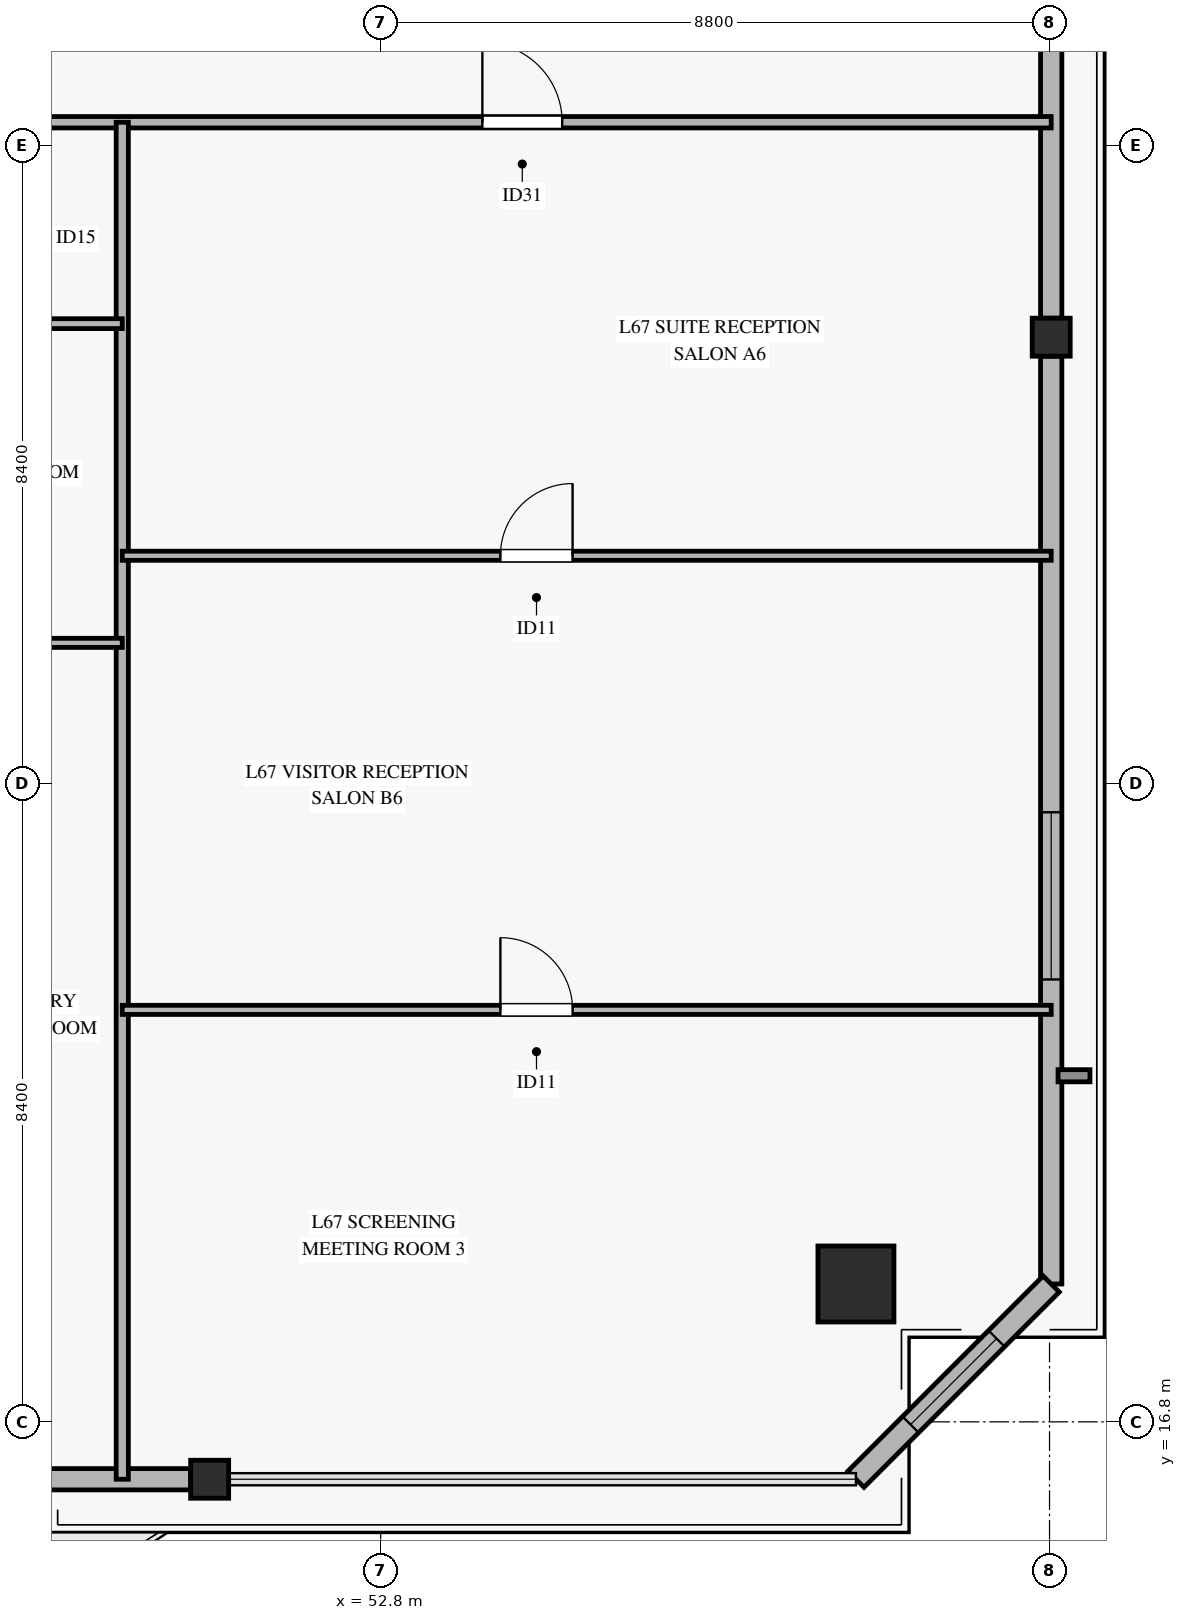
"""IFC4 building model, lengths in metres.
Left out: names, types, materials, properties, quantities, classifications, styles, units other than length and angle.
Written with IfcOpenShell. Run it as: python <this file> out.ifc"""

import sys

from ifc_helpers import new_model, si_unit, direction, frame, frame_2d, origin, origin_2d, place, context, subcontext, project, spatial, rectangle, hollow_rectangle, extrude, source, transform, mapped, element, fill, save


model = new_model("IFC4")
c1 = context("Model", 3, precision=1e-05, world=origin(), true_north=direction((0.0, 1.0)))
c2 = subcontext(c1, "Body", "Model", "MODEL_VIEW")
j1 = project(units=[si_unit("LENGTHUNIT", "METRE"), si_unit("PLANEANGLEUNIT", "RADIAN")], contexts=[c1])
p1 = place(None, origin())
s1 = spatial("IfcSite", under=j1, at=p1, CompositionType="ELEMENT")
p2 = place(p1, origin())
s2 = spatial("IfcBuilding", under=s1, at=p2, CompositionType="ELEMENT")
p3 = place(p2, frame((0.0, 0.0, 262.1)))
s3 = spatial("IfcBuildingStorey", under=s2, at=p3, CompositionType="ELEMENT", Elevation=262.1)
m1 = source(origin(), c2, "Body", "SweptSolid", [
    extrude(hollow_rectangle(XDim=1.0, YDim=1.0, WallThickness=0.045, at=origin_2d()), origin(), (0.0, 0.0, 1.0), 3.185),
])
p4 = place(p3, frame((59.053, 18.614, 0.0), z_axis=(0.0, 0.0, 1.0), x_axis=(1.0, 0.0, 0.0)))
e1 = element("IfcColumn", 1, at=p4, inside=s3, PredefinedType="COLUMN", context=c2, shape_type="MappedRepresentation", body=[
    mapped(m1, transform((0.0, 0.0, 0.0), x_axis=(1.0, 0.0, 0.0), y_axis=(0.0, 1.0, 0.0), z_axis=(0.0, 0.0, 1.0), scale=1.0)),
])
m2 = source(origin(), c2, "Body", "SweptSolid", [
    extrude(hollow_rectangle(XDim=0.5, YDim=0.5, WallThickness=0.024, at=origin_2d()), origin(), (0.0, 0.0, 1.0), 3.185),
])
for number, where, z_axis, x_axis in (
    (2, (50.55, 16.045, 0.0), (0.0, 0.0, 1.0), (1.0, 0.0, 0.0)),
    (3, (61.622, 31.072, 0.0), (0.0, 0.0, 1.0), (1.0, 0.0, 0.0)),
):
    element("IfcColumn", number, at=place(p3, frame(where, z_axis=z_axis, x_axis=x_axis)), inside=s3, PredefinedType="COLUMN", context=c2, shape_type="MappedRepresentation", body=[
        mapped(m2, transform((0.0, 0.0, 0.0), x_axis=(1.0, 0.0, 0.0), y_axis=(0.0, 1.0, 0.0), z_axis=(0.0, 0.0, 1.0), scale=1.0)),
    ])
p5 = place(p3, frame((44.55, 16.045, 0.0), z_axis=(0.0, 0.0, 1.0), x_axis=(1.0, 0.0, 0.0)))
e4 = element("IfcWall", 4, at=p5, inside=s3, PredefinedType="SOLIDWALL", context=c2, shape_type="SweptSolid", body=[
    extrude(rectangle(XDim=5.75, YDim=0.28, at=frame_2d((2.875, 0.0))), origin(), (0.0, 0.0, 1.0), 2.815),
])
p6 = place(p5, frame((1.95, 0.0, 0.0)))
e5 = element("IfcOpeningElement", 5, at=p6, cuts=e4, PredefinedType="OPENING", context=c2, shape_type="SweptSolid", body=[
    extrude(rectangle(XDim=1.8, YDim=2.25, at=frame_2d((0.9, 1.125))), frame((0.0, 0.15, 0.0), z_axis=(0.0, -1.0, 0.0), x_axis=(1.0, 0.0, 0.0)), (0.0, 0.0, 1.0), 0.3),
])
p7 = place(p3, frame((61.622, 18.614, 0.0), z_axis=(0.0, 0.0, 1.0), x_axis=(0.0, 1.0, 0.0)))
e6 = element("IfcWall", 6, at=p7, inside=s3, PredefinedType="SOLIDWALL", context=c2, shape_type="SweptSolid", body=[
    extrude(rectangle(XDim=12.208, YDim=0.28, at=frame_2d((6.104, 0.0))), origin(), (0.0, 0.0, 1.0), 2.815),
])
p8 = place(p7, frame((4.007, 0.0, 0.45)))
e7 = element("IfcOpeningElement", 7, at=p8, cuts=e6, PredefinedType="OPENING", context=c2, shape_type="SweptSolid", body=[
    extrude(rectangle(XDim=2.2, YDim=2.1, at=frame_2d((1.1, 1.05))), frame((0.0, 0.15, 0.0), z_axis=(0.0, -1.0, 0.0), x_axis=(1.0, 0.0, 0.0)), (0.0, 0.0, 1.0), 0.3),
])
p9 = place(p3, frame((61.622, 31.322, 0.0), z_axis=(0.0, 0.0, 1.0), x_axis=(0.0, 1.0, 0.0)))
e8 = element("IfcWall", 8, at=p9, inside=s3, PredefinedType="SOLIDWALL", context=c2, shape_type="SweptSolid", body=[
    extrude(rectangle(XDim=12.208, YDim=0.28, at=frame_2d((6.104, 0.0))), origin(), (0.0, 0.0, 1.0), 2.815),
])
p10 = place(p9, frame((7.171, 0.0, 0.45)))
e9 = element("IfcOpeningElement", 9, at=p10, cuts=e8, PredefinedType="OPENING", context=c2, shape_type="SweptSolid", body=[
    extrude(rectangle(XDim=2.2, YDim=2.1, at=frame_2d((1.1, 1.05))), frame((0.0, 0.15, 0.0), z_axis=(0.0, -1.0, 0.0), x_axis=(1.0, 0.0, 0.0)), (0.0, 0.0, 1.0), 0.3),
])
p11 = place(p3, frame((59.053, 16.045, 0.0), z_axis=(0.0, 0.0, 1.0), x_axis=(0.707106781187, 0.707106781187, 0.0)))
e10 = element("IfcWall", 10, at=p11, inside=s3, PredefinedType="SOLIDWALL", context=c2, shape_type="SweptSolid", body=[
    extrude(rectangle(XDim=3.633, YDim=0.3, at=frame_2d((1.817, 0.0))), origin(), (0.0, 0.0, 1.0), 2.815),
])
p12 = place(p11, frame((1.017, 0.0, 0.45)))
e11 = element("IfcOpeningElement", 11, at=p12, cuts=e10, PredefinedType="OPENING", context=c2, shape_type="SweptSolid", body=[
    extrude(rectangle(XDim=1.6, YDim=2.0, at=frame_2d((0.8, 1.0))), frame((0.0, 0.16, 0.0), z_axis=(0.0, -1.0, 0.0), x_axis=(1.0, 0.0, 0.0)), (0.0, 0.0, 1.0), 0.32),
])
p13 = place(p3, frame((8.779, 33.9, 0.0), z_axis=(0.0, 0.0, 1.0), x_axis=(1.0, 0.0, 0.0)))
e12 = element("IfcWall", 12, at=p13, inside=s3, PredefinedType="PARTITIONING", context=c2, shape_type="SweptSolid", body=[
    extrude(rectangle(XDim=52.843, YDim=0.15, at=frame_2d((26.421, 0.0))), origin(), (0.0, 0.0, 1.0), 2.47),
])
p14 = place(p13, frame((5.887, 0.0, 0.0)))
e13 = element("IfcOpeningElement", 13, at=p14, cuts=e12, PredefinedType="OPENING", context=c2, shape_type="SweptSolid", body=[
    extrude(rectangle(XDim=1.05, YDim=2.15, at=frame_2d((0.525, 1.075))), frame((0.0, 0.085, 0.0), z_axis=(0.0, -1.0, 0.0), x_axis=(1.0, 0.0, 0.0)), (0.0, 0.0, 1.0), 0.17),
])
p15 = place(p13, frame((17.646, 0.0, 0.0)))
e14 = element("IfcOpeningElement", 14, at=p15, cuts=e12, PredefinedType="OPENING", context=c2, shape_type="SweptSolid", body=[
    extrude(rectangle(XDim=1.05, YDim=2.15, at=frame_2d((0.525, 1.075))), frame((0.0, 0.085, 0.0), z_axis=(0.0, -1.0, 0.0), x_axis=(1.0, 0.0, 0.0)), (0.0, 0.0, 1.0), 0.17),
])
p16 = place(p13, frame((24.174, 0.0, 0.0)))
e15 = element("IfcOpeningElement", 15, at=p16, cuts=e12, PredefinedType="OPENING", context=c2, shape_type="SweptSolid", body=[
    extrude(rectangle(XDim=1.05, YDim=2.15, at=frame_2d((0.525, 1.075))), frame((0.0, 0.085, 0.0), z_axis=(0.0, -1.0, 0.0), x_axis=(1.0, 0.0, 0.0)), (0.0, 0.0, 1.0), 0.17),
])
p17 = place(p13, frame((31.096, 0.0, 0.0)))
e16 = element("IfcOpeningElement", 16, at=p17, cuts=e12, PredefinedType="OPENING", context=c2, shape_type="SweptSolid", body=[
    extrude(rectangle(XDim=1.05, YDim=2.15, at=frame_2d((0.525, 1.075))), frame((0.0, 0.085, 0.0), z_axis=(0.0, -1.0, 0.0), x_axis=(1.0, 0.0, 0.0)), (0.0, 0.0, 1.0), 0.17),
])
p18 = place(p13, frame((37.241, 0.0, 0.0)))
e17 = element("IfcOpeningElement", 17, at=p18, cuts=e12, PredefinedType="OPENING", context=c2, shape_type="SweptSolid", body=[
    extrude(rectangle(XDim=1.05, YDim=2.15, at=frame_2d((0.525, 1.075))), frame((0.0, 0.085, 0.0), z_axis=(0.0, -1.0, 0.0), x_axis=(1.0, 0.0, 0.0)), (0.0, 0.0, 1.0), 0.17),
])
p19 = place(p13, frame((45.359, 0.0, 0.0)))
e18 = element("IfcOpeningElement", 18, at=p19, cuts=e12, PredefinedType="OPENING", context=c2, shape_type="SweptSolid", body=[
    extrude(rectangle(XDim=1.05, YDim=2.15, at=frame_2d((0.525, 1.075))), frame((0.0, 0.085, 0.0), z_axis=(0.0, -1.0, 0.0), x_axis=(1.0, 0.0, 0.0)), (0.0, 0.0, 1.0), 0.17),
])
p20 = place(p3, frame((49.4, 16.045, 0.0), z_axis=(0.0, 0.0, 1.0), x_axis=(0.0, 1.0, 0.0)))
e19 = element("IfcWall", 19, at=p20, inside=s3, PredefinedType="PARTITIONING", context=c2, shape_type="SweptSolid", body=[
    extrude(rectangle(XDim=17.855, YDim=0.16, at=frame_2d((8.927, 0.0))), origin(), (0.0, 0.0, 1.0), 2.77),
])
p21 = place(p3, frame((47.82, 31.25, 0.0), z_axis=(0.0, 0.0, 1.0), x_axis=(1.0, 0.0, 0.0)))
e20 = element("IfcWall", 20, at=p21, inside=s3, PredefinedType="PARTITIONING", context=c2, shape_type="SweptSolid", body=[
    extrude(rectangle(XDim=1.58, YDim=0.13, at=frame_2d((0.79, 0.0))), origin(), (0.0, 0.0, 1.0), 3.185),
])
p22 = place(p3, frame((45.72, 27.05, 0.0), z_axis=(0.0, 0.0, 1.0), x_axis=(1.0, 0.0, 0.0)))
e21 = element("IfcWall", 21, at=p22, inside=s3, PredefinedType="PARTITIONING", context=c2, shape_type="SweptSolid", body=[
    extrude(rectangle(XDim=3.68, YDim=0.12, at=frame_2d((1.84, 0.0))), origin(), (0.0, 0.0, 1.0), 3.185),
])
p23 = place(p3, frame((49.4, 22.221, 0.0), z_axis=(0.0, 0.0, 1.0), x_axis=(1.0, 0.0, 0.0)))
e22 = element("IfcWall", 22, at=p23, inside=s3, PredefinedType="PARTITIONING", context=c2, shape_type="SweptSolid", body=[
    extrude(rectangle(XDim=12.222, YDim=0.12, at=frame_2d((6.111, 0.0))), origin(), (0.0, 0.0, 1.0), 2.47),
])
p24 = place(p23, frame((4.975, 0.0, 0.0)))
e23 = element("IfcOpeningElement", 23, at=p24, cuts=e22, PredefinedType="OPENING", context=c2, shape_type="SweptSolid", body=[
    extrude(rectangle(XDim=0.95, YDim=2.1, at=frame_2d((0.475, 1.05))), frame((0.0, 0.07, 0.0), z_axis=(0.0, -1.0, 0.0), x_axis=(1.0, 0.0, 0.0)), (0.0, 0.0, 1.0), 0.14),
])
p25 = place(p3, frame((49.4, 28.196, 0.0), z_axis=(0.0, 0.0, 1.0), x_axis=(1.0, 0.0, 0.0)))
e24 = element("IfcWall", 24, at=p25, inside=s3, PredefinedType="PARTITIONING", context=c2, shape_type="SweptSolid", body=[
    extrude(rectangle(XDim=12.222, YDim=0.12, at=frame_2d((6.111, 0.0))), origin(), (0.0, 0.0, 1.0), 2.47),
])
p26 = place(p25, frame((4.975, 0.0, 0.0)))
e25 = element("IfcOpeningElement", 25, at=p26, cuts=e24, PredefinedType="OPENING", context=c2, shape_type="SweptSolid", body=[
    extrude(rectangle(XDim=0.95, YDim=2.1, at=frame_2d((0.475, 1.05))), frame((0.0, 0.07, 0.0), z_axis=(0.0, -1.0, 0.0), x_axis=(1.0, 0.0, 0.0)), (0.0, 0.0, 1.0), 0.14),
])
m3 = source(origin(), c2, "Body", "SweptSolid", [
    extrude(rectangle(XDim=2.2, YDim=2.1, at=frame_2d((1.1, 1.05))), frame((0.0, 0.03, 0.0), z_axis=(0.0, -1.0, 0.0), x_axis=(1.0, 0.0, 0.0)), (0.0, 0.0, 1.0), 0.06),
])
p27 = place(p8, origin())
e26 = element("IfcWindow", 26, at=p27, inside=s3, PartitioningType="SINGLE_PANEL", PredefinedType="WINDOW", context=c2, shape_type="MappedRepresentation", body=[
    mapped(m3, transform((0.0, 0.0, 0.0), x_axis=(1.0, 0.0, 0.0), y_axis=(0.0, 1.0, 0.0), z_axis=(0.0, 0.0, 1.0), scale=1.0)),
])
fill(e7, e26)
m4 = source(origin(), c2, "Body", "SweptSolid", [
    extrude(rectangle(XDim=1.6, YDim=2.0, at=frame_2d((0.8, 1.0))), frame((0.0, 0.03, 0.0), z_axis=(0.0, -1.0, 0.0), x_axis=(1.0, 0.0, 0.0)), (0.0, 0.0, 1.0), 0.06),
])
p28 = place(p12, origin())
e27 = element("IfcWindow", 27, at=p28, inside=s3, PartitioningType="SINGLE_PANEL", PredefinedType="WINDOW", context=c2, shape_type="MappedRepresentation", body=[
    mapped(m4, transform((0.0, 0.0, 0.0), x_axis=(1.0, 0.0, 0.0), y_axis=(0.0, 1.0, 0.0), z_axis=(0.0, 0.0, 1.0), scale=1.0)),
])
fill(e11, e27)
m5 = source(origin(), c2, "Body", "SweptSolid", [
    extrude(rectangle(XDim=1.05, YDim=2.15, at=frame_2d((0.525, 1.075))), frame((0.0, 0.025, 0.0), z_axis=(0.0, -1.0, 0.0), x_axis=(1.0, 0.0, 0.0)), (0.0, 0.0, 1.0), 0.05),
])
p29 = place(p19, origin())
e28 = element("IfcDoor", 28, at=p29, inside=s3, OperationType="SINGLE_SWING_LEFT", PredefinedType="DOOR", context=c2, shape_type="MappedRepresentation", body=[
    mapped(m5, transform((0.0, 0.0, 0.0), x_axis=(1.0, 0.0, 0.0), y_axis=(0.0, 1.0, 0.0), z_axis=(0.0, 0.0, 1.0), scale=1.0)),
])
fill(e18, e28)
m6 = source(origin(), c2, "Body", "SweptSolid", [
    extrude(rectangle(XDim=0.95, YDim=2.1, at=frame_2d((0.475, 1.05))), frame((0.0, 0.025, 0.0), z_axis=(0.0, -1.0, 0.0), x_axis=(1.0, 0.0, 0.0)), (0.0, 0.0, 1.0), 0.05),
])
p30 = place(p26, origin())
e29 = element("IfcDoor", 29, at=p30, inside=s3, OperationType="SINGLE_SWING_RIGHT", PredefinedType="DOOR", context=c2, shape_type="MappedRepresentation", body=[
    mapped(m6, transform((0.0, 0.0, 0.0), x_axis=(1.0, 0.0, 0.0), y_axis=(0.0, 1.0, 0.0), z_axis=(0.0, 0.0, 1.0), scale=1.0)),
])
fill(e25, e29)
p31 = place(p24, origin())
e30 = element("IfcDoor", 30, at=p31, inside=s3, OperationType="SINGLE_SWING_LEFT", PredefinedType="DOOR", context=c2, shape_type="MappedRepresentation", body=[
    mapped(m6, transform((0.0, 0.0, 0.0), x_axis=(1.0, 0.0, 0.0), y_axis=(0.0, 1.0, 0.0), z_axis=(0.0, 0.0, 1.0), scale=1.0)),
])
fill(e23, e30)
save(model, sys.argv[1])
